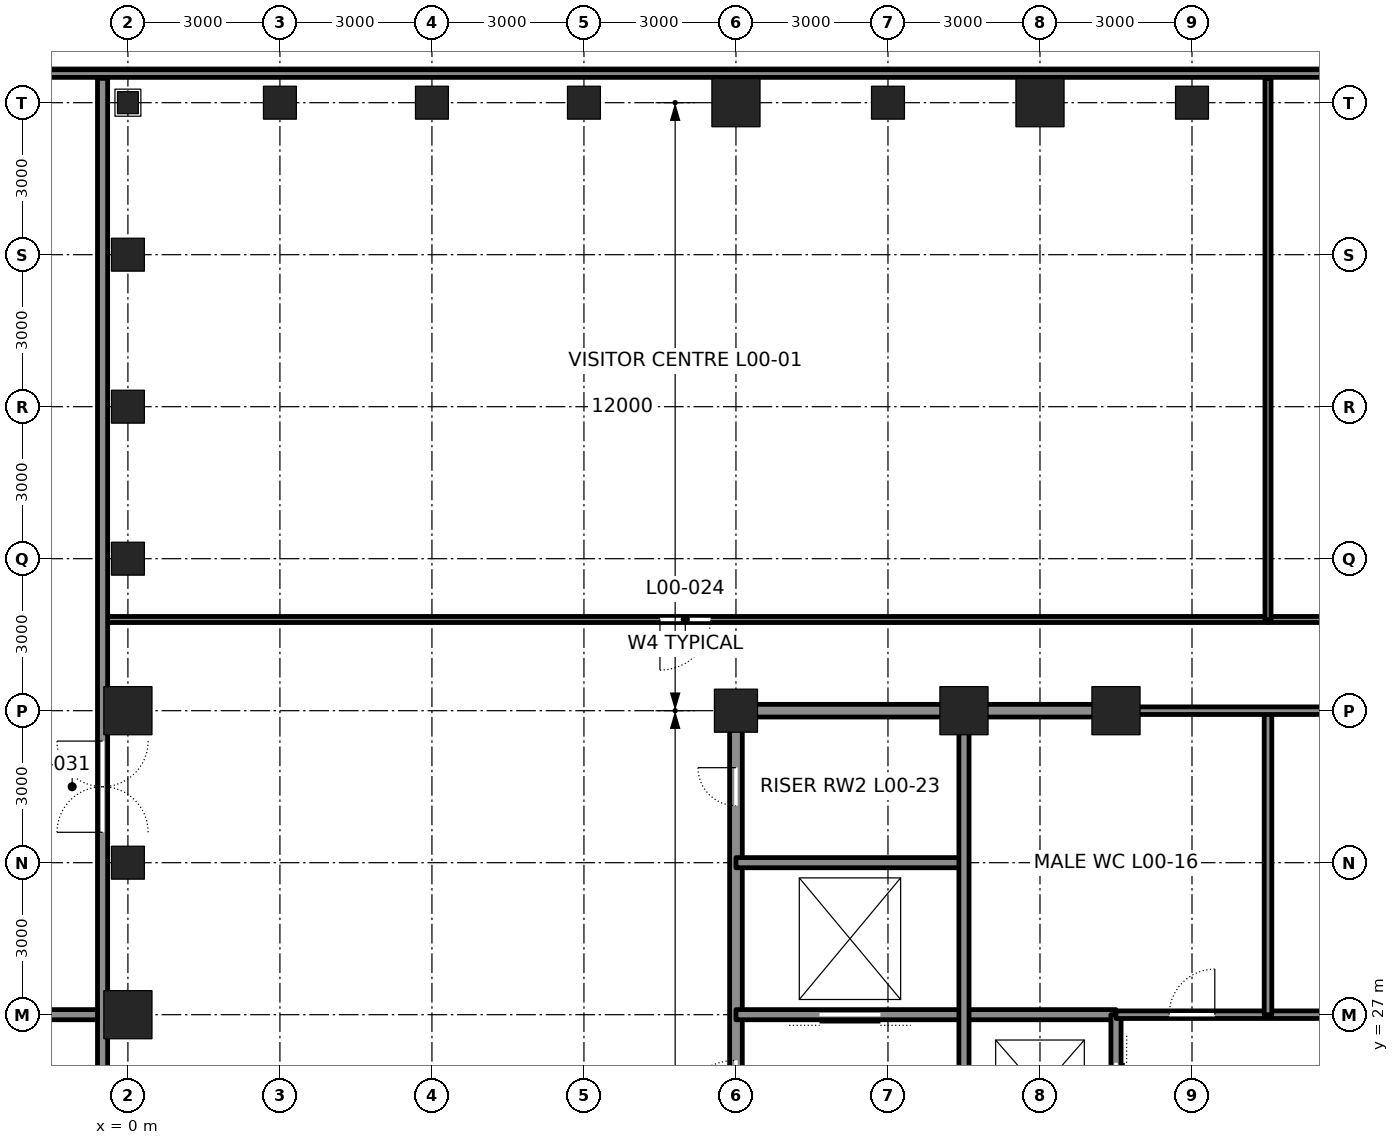
"""IFC4 building model, lengths in metres.
Left out: names, types, materials, properties, quantities, classifications, styles, units other than length and angle.
Written with IfcOpenShell. Run it as: python <this file> out.ifc"""

import sys

from ifc_helpers import new_model, si_unit, direction, frame, frame_2d, origin, origin_2d, place, context, subcontext, project, spatial, rectangle, hollow_rectangle, i_section, extrude, element, fill, save


model = new_model("IFC4")
c1 = context("Model", 3, precision=1e-05, world=origin(), true_north=direction((0.0, 1.0)))
c2 = subcontext(c1, "Body", "Model", "MODEL_VIEW")
j1 = project(units=[si_unit("LENGTHUNIT", "METRE"), si_unit("PLANEANGLEUNIT", "RADIAN")], contexts=[c1])
p1 = place(None, origin())
s1 = spatial("IfcSite", under=j1, at=p1, CompositionType="ELEMENT")
p2 = place(p1, origin())
s2 = spatial("IfcBuilding", under=s1, at=p2, CompositionType="ELEMENT")
p3 = place(p2, origin())
s3 = spatial("IfcBuildingStorey", under=s2, at=p3, CompositionType="ELEMENT", Elevation=0.0)
p4 = place(p3, frame((21.0, 45.0, 0.0), z_axis=(0.0, 0.0, 1.0), x_axis=(0.0, 1.0, 0.0)))
e1 = element("IfcColumn", 1, at=p4, inside=s3, PredefinedType="COLUMN", context=c2, shape_type="SweptSolid", body=[
    extrude(hollow_rectangle(XDim=0.65, YDim=0.65, WallThickness=0.065, at=origin_2d()), origin(), (0.0, 0.0, 1.0), 6.0),
])
p5 = place(p3, frame((18.0, 45.0, 0.0), z_axis=(0.0, 0.0, 1.0), x_axis=(0.0, 1.0, 0.0)))
e2 = element("IfcColumn", 2, at=p5, inside=s3, PredefinedType="COLUMN", context=c2, shape_type="SweptSolid", body=[
    extrude(hollow_rectangle(XDim=0.95, YDim=0.95, WallThickness=0.11, at=origin_2d()), origin(), (0.0, 0.0, 1.0), 6.0),
])
p6 = place(p3, frame((15.0, 45.0, 0.0), z_axis=(0.0, 0.0, 1.0), x_axis=(0.0, 1.0, 0.0)))
e3 = element("IfcColumn", 3, at=p6, inside=s3, PredefinedType="COLUMN", context=c2, shape_type="SweptSolid", body=[
    extrude(hollow_rectangle(XDim=0.65, YDim=0.65, WallThickness=0.065, at=origin_2d()), origin(), (0.0, 0.0, 1.0), 6.0),
])
p7 = place(p3, frame((12.0, 45.0, 0.0), z_axis=(0.0, 0.0, 1.0), x_axis=(0.0, 1.0, 0.0)))
e4 = element("IfcColumn", 4, at=p7, inside=s3, PredefinedType="COLUMN", context=c2, shape_type="SweptSolid", body=[
    extrude(hollow_rectangle(XDim=0.95, YDim=0.95, WallThickness=0.11, at=origin_2d()), origin(), (0.0, 0.0, 1.0), 6.0),
])
for number, where, z_axis, x_axis in (
    (5, (9.0, 45.0, 0.0), (0.0, 0.0, 1.0), (0.0, 1.0, 0.0)),
    (6, (6.0, 45.0, 0.0), (0.0, 0.0, 1.0), (0.0, 1.0, 0.0)),
    (7, (3.0, 45.0, 0.0), (0.0, 0.0, 1.0), (0.0, 1.0, 0.0)),
    (8, (0.0, 42.0, 0.0), (0.0, 0.0, 1.0), (-1.0, 0.0, 0.0)),
    (9, (0.0, 39.0, 0.0), (0.0, 0.0, 1.0), (-1.0, 0.0, 0.0)),
    (10, (0.0, 36.0, 0.0), (0.0, 0.0, 1.0), (-1.0, 0.0, 0.0)),
):
    element("IfcColumn", number, at=place(p3, frame(where, z_axis=z_axis, x_axis=x_axis)), inside=s3, PredefinedType="COLUMN", context=c2, shape_type="SweptSolid", body=[
        extrude(hollow_rectangle(XDim=0.65, YDim=0.65, WallThickness=0.065, at=origin_2d()), origin(), (0.0, 0.0, 1.0), 6.0),
    ])
p8 = place(p3, frame((0.0, 33.0, 0.0), z_axis=(0.0, 0.0, 1.0), x_axis=(-1.0, 0.0, 0.0)))
e11 = element("IfcColumn", 11, at=p8, inside=s3, PredefinedType="COLUMN", context=c2, shape_type="SweptSolid", body=[
    extrude(hollow_rectangle(XDim=0.95, YDim=0.95, WallThickness=0.11, at=origin_2d()), origin(), (0.0, 0.0, 1.0), 6.0),
])
p9 = place(p3, frame((0.0, 30.0, 0.0), z_axis=(0.0, 0.0, 1.0), x_axis=(-1.0, 0.0, 0.0)))
e12 = element("IfcColumn", 12, at=p9, inside=s3, PredefinedType="COLUMN", context=c2, shape_type="SweptSolid", body=[
    extrude(hollow_rectangle(XDim=0.65, YDim=0.65, WallThickness=0.065, at=origin_2d()), origin(), (0.0, 0.0, 1.0), 6.0),
])
p10 = place(p3, frame((0.0, 27.0, 0.0), z_axis=(0.0, 0.0, 1.0), x_axis=(-1.0, 0.0, 0.0)))
e13 = element("IfcColumn", 13, at=p10, inside=s3, PredefinedType="COLUMN", context=c2, shape_type="SweptSolid", body=[
    extrude(hollow_rectangle(XDim=0.95, YDim=0.95, WallThickness=0.11, at=origin_2d()), origin(), (0.0, 0.0, 1.0), 6.0),
])
p11 = place(p3, frame((12.0, 33.0, 0.0), z_axis=(0.0, 0.0, 1.0), x_axis=(1.0, 0.0, 0.0)))
e14 = element("IfcColumn", 14, at=p11, inside=s3, PredefinedType="COLUMN", context=c2, shape_type="SweptSolid", body=[
    extrude(hollow_rectangle(XDim=0.85, YDim=0.85, WallThickness=0.085, at=origin_2d()), origin(), (0.0, 0.0, 1.0), 6.0),
])
for number, where, z_axis, x_axis in (
    (15, (16.5, 33.0, 0.0), (0.0, 0.0, 1.0), (1.0, 0.0, 0.0)),
    (16, (19.5, 33.0, 0.0), (0.0, 0.0, 1.0), (1.0, 0.0, 0.0)),
):
    element("IfcColumn", number, at=place(p3, frame(where, z_axis=z_axis, x_axis=x_axis)), inside=s3, PredefinedType="COLUMN", context=c2, shape_type="SweptSolid", body=[
        extrude(hollow_rectangle(XDim=0.95, YDim=0.95, WallThickness=0.095, at=origin_2d()), origin(), (0.0, 0.0, 1.0), 6.0),
    ])
p12 = place(p3, frame((0.0, 45.0, 0.0), z_axis=(0.0, 0.0, 1.0), x_axis=(1.0, 0.0, 0.0)))
e17 = element("IfcColumn", 17, at=p12, inside=s3, PredefinedType="COLUMN", context=c2, shape_type="SweptSolid", body=[
    extrude(i_section(OverallWidth=0.411, OverallDepth=0.434, WebThickness=0.036, FlangeThickness=0.057, at=origin_2d()), origin(), (0.0, 0.0, 1.0), 6.0),
])
p13 = place(p3, frame((54.5, 45.575, 0.0), z_axis=(0.0, 0.0, 1.0), x_axis=(-1.0, 0.0, 0.0)))
e18 = element("IfcWall", 18, at=p13, inside=s3, PredefinedType="SOLIDWALL", context=c2, shape_type="SweptSolid", body=[
    extrude(rectangle(XDim=64.0, YDim=0.15, at=frame_2d((32.0, 0.0))), origin(), (0.0, 0.0, 1.0), 5.8),
])
p14 = place(p13, frame((56.9, 0.0, 0.0)))
e19 = element("IfcOpeningElement", 19, at=p14, cuts=e18, PredefinedType="OPENING", context=c2, shape_type="SweptSolid", body=[
    extrude(rectangle(XDim=1.2, YDim=2.1, at=frame_2d((0.6, 1.05))), frame((0.0, 0.085, 0.0), z_axis=(0.0, -1.0, 0.0), x_axis=(1.0, 0.0, 0.0)), (0.0, 0.0, 1.0), 0.17),
])
p15 = place(p13, frame((5.9, 0.0, 0.0)))
e20 = element("IfcOpeningElement", 20, at=p15, cuts=e18, PredefinedType="OPENING", context=c2, shape_type="SweptSolid", body=[
    extrude(rectangle(XDim=1.2, YDim=2.1, at=frame_2d((0.6, 1.05))), frame((0.0, 0.085, 0.0), z_axis=(0.0, -1.0, 0.0), x_axis=(1.0, 0.0, 0.0)), (0.0, 0.0, 1.0), 0.17),
])
p16 = place(p3, frame((12.0, 24.25, 0.0), z_axis=(0.0, 0.0, 1.0), x_axis=(0.0, 1.0, 0.0)))
e21 = element("IfcWall", 21, at=p16, inside=s3, PredefinedType="SOLIDWALL", context=c2, shape_type="SweptSolid", body=[
    extrude(rectangle(XDim=8.5, YDim=0.25, at=frame_2d((4.25, 0.0))), origin(), (0.0, 0.0, 1.0), 4.873),
])
p17 = place(p16, frame((0.65, 0.0, 0.0)))
e22 = element("IfcOpeningElement", 22, at=p17, cuts=e21, PredefinedType="OPENING", context=c2, shape_type="SweptSolid", body=[
    extrude(rectangle(XDim=1.2, YDim=2.1, at=frame_2d((0.6, 1.05))), frame((0.0, 0.135, 0.0), z_axis=(0.0, -1.0, 0.0), x_axis=(1.0, 0.0, 0.0)), (0.0, 0.0, 1.0), 0.27),
])
p18 = place(p16, frame((6.875, 0.0, 0.0)))
e23 = element("IfcOpeningElement", 23, at=p18, cuts=e21, PredefinedType="OPENING", context=c2, shape_type="SweptSolid", body=[
    extrude(rectangle(XDim=0.75, YDim=2.1, at=frame_2d((0.375, 1.05))), frame((0.0, 0.135, 0.0), z_axis=(0.0, -1.0, 0.0), x_axis=(1.0, 0.0, 0.0)), (0.0, 0.0, 1.0), 0.27),
])
p19 = place(p3, frame((12.0, 27.0, 0.0), z_axis=(0.0, 0.0, 1.0), x_axis=(1.0, 0.0, 0.0)))
e24 = element("IfcWall", 24, at=p19, inside=s3, PredefinedType="SOLIDWALL", context=c2, shape_type="SweptSolid", body=[
    extrude(rectangle(XDim=7.5, YDim=0.2, at=frame_2d((3.75, 0.0))), origin(), (0.0, 0.0, 1.0), 5.8),
])
p20 = place(p19, frame((1.65, 0.0, 0.0)))
e25 = element("IfcOpeningElement", 25, at=p20, cuts=e24, PredefinedType="OPENING", context=c2, shape_type="SweptSolid", body=[
    extrude(rectangle(XDim=1.2, YDim=2.1, at=frame_2d((0.6, 1.05))), frame((0.0, 0.11, 0.0), z_axis=(0.0, -1.0, 0.0), x_axis=(1.0, 0.0, 0.0)), (0.0, 0.0, 1.0), 0.22),
])
p21 = place(p3, frame((12.0, 30.0, 0.0), z_axis=(0.0, 0.0, 1.0), x_axis=(1.0, 0.0, 0.0)))
e26 = element("IfcWall", 26, at=p21, inside=s3, PredefinedType="SOLIDWALL", context=c2, shape_type="SweptSolid", body=[
    extrude(rectangle(XDim=4.5, YDim=0.2, at=frame_2d((2.25, 0.0))), origin(), (0.0, 0.0, 1.0), 5.8),
])
p22 = place(p3, frame((12.25, 33.0, 0.0), z_axis=(0.0, 0.0, 1.0), x_axis=(1.0, 0.0, 0.0)))
e27 = element("IfcWall", 27, at=p22, inside=s3, PredefinedType="SOLIDWALL", context=c2, shape_type="SweptSolid", body=[
    extrude(rectangle(XDim=4.0, YDim=0.25, at=frame_2d((2.0, 0.0))), origin(), (0.0, 0.0, 1.0), 4.941),
])
p23 = place(p3, frame((16.75, 33.0, 0.0), z_axis=(0.0, 0.0, 1.0), x_axis=(1.0, 0.0, 0.0)))
e28 = element("IfcWall", 28, at=p23, inside=s3, PredefinedType="SOLIDWALL", context=c2, shape_type="SweptSolid", body=[
    extrude(rectangle(XDim=2.5, YDim=0.25, at=frame_2d((1.25, 0.0))), origin(), (0.0, 0.0, 1.0), 4.941),
])
p24 = place(p3, frame((16.5, 24.25, 0.0), z_axis=(0.0, 0.0, 1.0), x_axis=(0.0, 1.0, 0.0)))
e29 = element("IfcWall", 29, at=p24, inside=s3, PredefinedType="SOLIDWALL", context=c2, shape_type="SweptSolid", body=[
    extrude(rectangle(XDim=8.5, YDim=0.2, at=frame_2d((4.25, 0.0))), origin(), (0.0, 0.0, 1.0), 4.873),
])
p25 = place(p3, frame((19.5, 15.0, 0.0), z_axis=(0.0, 0.0, 1.0), x_axis=(0.0, 1.0, 0.0)))
e30 = element("IfcWall", 30, at=p25, inside=s3, PredefinedType="SOLIDWALL", context=c2, shape_type="SweptSolid", body=[
    extrude(rectangle(XDim=12.0, YDim=0.2, at=frame_2d((6.0, 0.0))), origin(), (0.0, 0.0, 1.0), 4.825),
])
p26 = place(p25, frame((0.95, 0.0, 0.0)))
e31 = element("IfcOpeningElement", 31, at=p26, cuts=e30, PredefinedType="OPENING", context=c2, shape_type="SweptSolid", body=[
    extrude(rectangle(XDim=1.1, YDim=2.1, at=frame_2d((0.55, 1.05))), frame((0.0, 0.11, 0.0), z_axis=(0.0, -1.0, 0.0), x_axis=(1.0, 0.0, 0.0)), (0.0, 0.0, 1.0), 0.22),
])
p27 = place(p25, frame((3.95, 0.0, 0.0)))
e32 = element("IfcOpeningElement", 32, at=p27, cuts=e30, PredefinedType="OPENING", context=c2, shape_type="SweptSolid", body=[
    extrude(rectangle(XDim=1.1, YDim=2.1, at=frame_2d((0.55, 1.05))), frame((0.0, 0.11, 0.0), z_axis=(0.0, -1.0, 0.0), x_axis=(1.0, 0.0, 0.0)), (0.0, 0.0, 1.0), 0.22),
])
p28 = place(p25, frame((6.95, 0.0, 0.0)))
e33 = element("IfcOpeningElement", 33, at=p28, cuts=e30, PredefinedType="OPENING", context=c2, shape_type="SweptSolid", body=[
    extrude(rectangle(XDim=1.1, YDim=2.1, at=frame_2d((0.55, 1.05))), frame((0.0, 0.11, 0.0), z_axis=(0.0, -1.0, 0.0), x_axis=(1.0, 0.0, 0.0)), (0.0, 0.0, 1.0), 0.22),
])
p29 = place(p25, frame((9.95, 0.0, 0.0)))
e34 = element("IfcOpeningElement", 34, at=p29, cuts=e30, PredefinedType="OPENING", context=c2, shape_type="SweptSolid", body=[
    extrude(rectangle(XDim=1.1, YDim=2.1, at=frame_2d((0.55, 1.05))), frame((0.0, 0.11, 0.0), z_axis=(0.0, -1.0, 0.0), x_axis=(1.0, 0.0, 0.0)), (0.0, 0.0, 1.0), 0.22),
])
p30 = place(p3, frame((19.5, 27.0, 0.0), z_axis=(0.0, 0.0, 1.0), x_axis=(1.0, 0.0, 0.0)))
e35 = element("IfcWall", 35, at=p30, inside=s3, PredefinedType="PARTITIONING", context=c2, shape_type="SweptSolid", body=[
    extrude(rectangle(XDim=6.0, YDim=0.15, at=frame_2d((3.0, 0.0))), origin(), (0.0, 0.0, 1.0), 5.8),
])
p31 = place(p30, frame((1.05, 0.0, 0.0)))
e36 = element("IfcOpeningElement", 36, at=p31, cuts=e35, PredefinedType="OPENING", context=c2, shape_type="SweptSolid", body=[
    extrude(rectangle(XDim=0.9, YDim=2.1, at=frame_2d((0.45, 1.05))), frame((0.0, 0.085, 0.0), z_axis=(0.0, -1.0, 0.0), x_axis=(1.0, 0.0, 0.0)), (0.0, 0.0, 1.0), 0.17),
])
p32 = place(p30, frame((4.05, 0.0, 0.0)))
e37 = element("IfcOpeningElement", 37, at=p32, cuts=e35, PredefinedType="OPENING", context=c2, shape_type="SweptSolid", body=[
    extrude(rectangle(XDim=0.9, YDim=2.1, at=frame_2d((0.45, 1.05))), frame((0.0, 0.085, 0.0), z_axis=(0.0, -1.0, 0.0), x_axis=(1.0, 0.0, 0.0)), (0.0, 0.0, 1.0), 0.17),
])
p33 = place(p3, frame((22.5, 27.0, 0.0), z_axis=(0.0, 0.0, 1.0), x_axis=(0.0, 1.0, 0.0)))
e38 = element("IfcWall", 38, at=p33, inside=s3, PredefinedType="PARTITIONING", context=c2, shape_type="SweptSolid", body=[
    extrude(rectangle(XDim=6.0, YDim=0.15, at=frame_2d((3.0, 0.0))), origin(), (0.0, 0.0, 1.0), 5.8),
])
p34 = place(p3, frame((19.5, 33.0, 0.0), z_axis=(0.0, 0.0, 1.0), x_axis=(1.0, 0.0, 0.0)))
e39 = element("IfcWall", 39, at=p34, inside=s3, PredefinedType="PARTITIONING", context=c2, shape_type="SweptSolid", body=[
    extrude(rectangle(XDim=6.0, YDim=0.15, at=frame_2d((3.0, 0.0))), origin(), (0.0, 0.0, 1.0), 4.941),
])
p35 = place(p3, frame((-0.5, 34.8, 0.0), z_axis=(0.0, 0.0, 1.0), x_axis=(1.0, 0.0, 0.0)))
e40 = element("IfcWall", 40, at=p35, inside=s3, PredefinedType="PARTITIONING", context=c2, shape_type="SweptSolid", body=[
    extrude(rectangle(XDim=23.0, YDim=0.12, at=frame_2d((11.5, 0.0))), origin(), (0.0, 0.0, 1.0), 5.8),
])
p36 = place(p35, frame((11.0, 0.0, 0.0)))
e41 = element("IfcOpeningElement", 41, at=p36, cuts=e40, PredefinedType="OPENING", context=c2, shape_type="SweptSolid", body=[
    extrude(rectangle(XDim=1.0, YDim=2.4, at=frame_2d((0.5, 1.2))), frame((0.0, 0.07, 0.0), z_axis=(0.0, -1.0, 0.0), x_axis=(1.0, 0.0, 0.0)), (0.0, 0.0, 1.0), 0.14),
])
p37 = place(p3, frame((22.5, 34.8, 0.0), z_axis=(0.0, 0.0, 1.0), x_axis=(1.0, 0.0, 0.0)))
e42 = element("IfcWall", 42, at=p37, inside=s3, PredefinedType="PARTITIONING", context=c2, shape_type="SweptSolid", body=[
    extrude(rectangle(XDim=23.0, YDim=0.12, at=frame_2d((11.5, 0.0))), origin(), (0.0, 0.0, 1.0), 5.8),
])
p38 = place(p37, frame((11.0, 0.0, 0.0)))
e43 = element("IfcOpeningElement", 43, at=p38, cuts=e42, PredefinedType="OPENING", context=c2, shape_type="SweptSolid", body=[
    extrude(rectangle(XDim=1.0, YDim=2.4, at=frame_2d((0.5, 1.2))), frame((0.0, 0.07, 0.0), z_axis=(0.0, -1.0, 0.0), x_axis=(1.0, 0.0, 0.0)), (0.0, 0.0, 1.0), 0.14),
])
p39 = place(p3, frame((22.5, 34.8, 0.0), z_axis=(0.0, 0.0, 1.0), x_axis=(0.0, 1.0, 0.0)))
e44 = element("IfcWall", 44, at=p39, inside=s3, PredefinedType="PARTITIONING", context=c2, shape_type="SweptSolid", body=[
    extrude(rectangle(XDim=10.68, YDim=0.12, at=frame_2d((5.34, 0.0))), origin(), (0.0, 0.0, 1.0), 5.8),
])
p40 = place(p3, frame((-0.5, -0.5, 0.0), z_axis=(0.0, 0.0, 1.0), x_axis=(0.0, 1.0, 0.0)))
e45 = element("IfcWall", 45, at=p40, inside=s3, PredefinedType="PARTITIONING", context=c2, shape_type="SweptSolid", body=[
    extrude(rectangle(XDim=45.98, YDim=0.2, at=frame_2d((22.99, 0.0))), origin(), (0.0, 0.0, 1.0), 5.8),
])
p41 = place(p40, frame((13.1, 0.0, 0.0)))
e46 = element("IfcOpeningElement", 46, at=p41, cuts=e45, PredefinedType="OPENING", context=c2, shape_type="SweptSolid", body=[
    extrude(rectangle(XDim=1.8, YDim=2.4, at=frame_2d((0.9, 1.2))), frame((0.0, 0.11, 0.0), z_axis=(0.0, -1.0, 0.0), x_axis=(1.0, 0.0, 0.0)), (0.0, 0.0, 1.0), 0.22),
])
p42 = place(p40, frame((19.1, 0.0, 0.0)))
e47 = element("IfcOpeningElement", 47, at=p42, cuts=e45, PredefinedType="OPENING", context=c2, shape_type="SweptSolid", body=[
    extrude(rectangle(XDim=1.8, YDim=2.4, at=frame_2d((0.9, 1.2))), frame((0.0, 0.11, 0.0), z_axis=(0.0, -1.0, 0.0), x_axis=(1.0, 0.0, 0.0)), (0.0, 0.0, 1.0), 0.22),
])
p43 = place(p40, frame((31.1, 0.0, 0.0)))
e48 = element("IfcOpeningElement", 48, at=p43, cuts=e45, PredefinedType="OPENING", context=c2, shape_type="SweptSolid", body=[
    extrude(rectangle(XDim=1.8, YDim=2.4, at=frame_2d((0.9, 1.2))), frame((0.0, 0.11, 0.0), z_axis=(0.0, -1.0, 0.0), x_axis=(1.0, 0.0, 0.0)), (0.0, 0.0, 1.0), 0.22),
])
p44 = place(p3, frame((-8.7, 27.0, 0.0), z_axis=(0.0, 0.0, 1.0), x_axis=(1.0, 0.0, 0.0)))
e49 = element("IfcWall", 49, at=p44, inside=s3, PredefinedType="PARTITIONING", context=c2, shape_type="SweptSolid", body=[
    extrude(rectangle(XDim=8.1, YDim=0.2, at=frame_2d((4.05, 0.0))), origin(), (0.0, 0.0, 1.0), 4.853),
])
p45 = place(p17, origin())
e50 = element("IfcDoor", 50, at=p45, inside=s3, OperationType="SINGLE_SWING_LEFT", PredefinedType="DOOR", context=c2, shape_type="SweptSolid", body=[
    extrude(rectangle(XDim=1.2, YDim=2.1, at=frame_2d((0.6, 1.05))), frame((0.0, 0.025, 0.0), z_axis=(0.0, -1.0, 0.0), x_axis=(1.0, 0.0, 0.0)), (0.0, 0.0, 1.0), 0.05),
])
fill(e22, e50)
p46 = place(p20, origin())
e51 = element("IfcDoor", 51, at=p46, inside=s3, OperationType="DOUBLE_DOOR_SLIDING", PredefinedType="DOOR", context=c2, shape_type="SweptSolid", body=[
    extrude(rectangle(XDim=1.2, YDim=2.1, at=frame_2d((0.6, 1.05))), frame((0.0, 0.025, 0.0), z_axis=(0.0, -1.0, 0.0), x_axis=(1.0, 0.0, 0.0)), (0.0, 0.0, 1.0), 0.05),
])
fill(e25, e51)
p47 = place(p18, origin())
e52 = element("IfcDoor", 52, at=p47, inside=s3, OperationType="SINGLE_SWING_RIGHT", PredefinedType="DOOR", context=c2, shape_type="SweptSolid", body=[
    extrude(rectangle(XDim=0.75, YDim=2.1, at=frame_2d((0.375, 1.05))), frame((0.0, 0.025, 0.0), z_axis=(0.0, -1.0, 0.0), x_axis=(1.0, 0.0, 0.0)), (0.0, 0.0, 1.0), 0.05),
])
fill(e23, e52)
p48 = place(p31, origin())
e53 = element("IfcDoor", 53, at=p48, inside=s3, OperationType="SINGLE_SWING_RIGHT", PredefinedType="DOOR", context=c2, shape_type="SweptSolid", body=[
    extrude(rectangle(XDim=0.9, YDim=2.1, at=frame_2d((0.45, 1.05))), frame((0.0, 0.025, 0.0), z_axis=(0.0, -1.0, 0.0), x_axis=(1.0, 0.0, 0.0)), (0.0, 0.0, 1.0), 0.05),
])
fill(e36, e53)
p49 = place(p29, origin())
e54 = element("IfcDoor", 54, at=p49, inside=s3, OperationType="DOUBLE_DOOR_SLIDING", PredefinedType="DOOR", context=c2, shape_type="SweptSolid", body=[
    extrude(rectangle(XDim=1.1, YDim=2.1, at=frame_2d((0.55, 1.05))), frame((0.0, 0.025, 0.0), z_axis=(0.0, -1.0, 0.0), x_axis=(1.0, 0.0, 0.0)), (0.0, 0.0, 1.0), 0.05),
])
fill(e34, e54)
p50 = place(p36, frame((1.0, 0.0, 0.0), z_axis=(0.0, 0.0, 1.0), x_axis=(-1.0, 0.0, 0.0)))
e55 = element("IfcDoor", 55, at=p50, inside=s3, OperationType="SINGLE_SWING_RIGHT", PredefinedType="DOOR", context=c2, shape_type="SweptSolid", body=[
    extrude(rectangle(XDim=1.0, YDim=2.4, at=frame_2d((0.5, 1.2))), frame((0.0, 0.025, 0.0), z_axis=(0.0, -1.0, 0.0), x_axis=(1.0, 0.0, 0.0)), (0.0, 0.0, 1.0), 0.05),
])
fill(e41, e55)
p51 = place(p43, origin())
e56 = element("IfcDoor", 56, at=p51, inside=s3, OperationType="DOUBLE_DOOR_DOUBLE_SWING", PredefinedType="DOOR", context=c2, shape_type="SweptSolid", body=[
    extrude(rectangle(XDim=1.8, YDim=2.4, at=frame_2d((0.9, 1.2))), frame((0.0, 0.025, 0.0), z_axis=(0.0, -1.0, 0.0), x_axis=(1.0, 0.0, 0.0)), (0.0, 0.0, 1.0), 0.05),
])
fill(e48, e56)
save(model, sys.argv[1])
